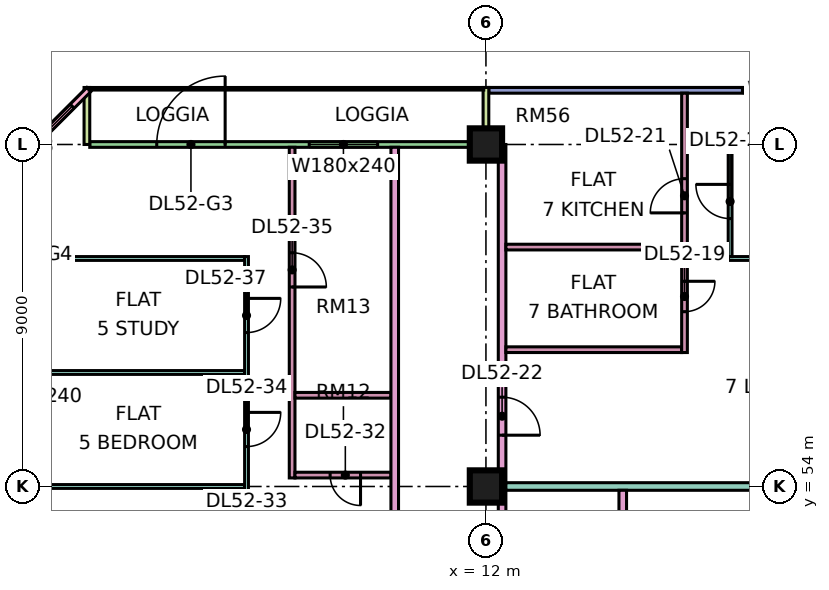
"""IFC4 building model, lengths in metres.
Left out: names, types, materials, properties, quantities, classifications, styles, units other than length and angle.
Written with IfcOpenShell. Run it as: python <this file> out.ifc"""

import sys

from ifc_helpers import new_model, si_unit, direction, frame, frame_2d, origin, origin_2d, place, context, subcontext, project, spatial, rectangle, extrude, element, fill, save


model = new_model("IFC4")
c1 = context("Model", 3, precision=1e-05, world=origin(), true_north=direction((0.0, 1.0)))
c2 = subcontext(c1, "Body", "Model", "MODEL_VIEW")
j1 = project(units=[si_unit("LENGTHUNIT", "METRE"), si_unit("PLANEANGLEUNIT", "RADIAN")], contexts=[c1])
p1 = place(None, origin())
s1 = spatial("IfcSite", under=j1, at=p1, CompositionType="ELEMENT")
p2 = place(p1, origin())
s2 = spatial("IfcBuilding", under=s1, at=p2, CompositionType="ELEMENT")
p3 = place(p2, frame((0.0, 0.0, 222.9)))
s3 = spatial("IfcBuildingStorey", under=s2, at=p3, CompositionType="ELEMENT", Elevation=222.9)
for number, where, z_axis, x_axis in (
    (1, (12.0, 54.0, 0.0), (0.0, 0.0, 1.0), (1.0, 0.0, 0.0)),
    (2, (12.0, 63.0, 0.0), (0.0, 0.0, 1.0), (1.0, 0.0, 0.0)),
):
    element("IfcColumn", number, at=place(p3, frame(where, z_axis=z_axis, x_axis=x_axis)), inside=s3, PredefinedType="COLUMN", context=c2, shape_type="SweptSolid", body=[
        extrude(rectangle(XDim=0.85, YDim=0.85, at=origin_2d()), origin(), (0.0, 0.0, 1.0), 3.75),
    ])
p4 = place(p3, frame((22.5, 64.425, 0.0), z_axis=(0.0, 0.0, 1.0), x_axis=(-1.0, 0.0, 0.0)))
e3 = element("IfcWall", 3, at=p4, inside=s3, PredefinedType="SOLIDWALL", context=c2, shape_type="SweptSolid", body=[
    extrude(rectangle(XDim=10.425, YDim=0.15, at=frame_2d((5.212, 0.0))), origin(), (0.0, 0.0, 1.0), 3.35),
])
p5 = place(p4, frame((0.75, 0.0, 0.45)))
e4 = element("IfcOpeningElement", 4, at=p5, cuts=e3, PredefinedType="OPENING", context=c2, shape_type="SweptSolid", body=[
    extrude(rectangle(XDim=3.0, YDim=2.4, at=frame_2d((1.5, 1.2))), frame((0.0, 0.085, 0.0), z_axis=(0.0, -1.0, 0.0), x_axis=(1.0, 0.0, 0.0)), (0.0, 0.0, 1.0), 0.17),
])
p6 = place(p3, frame((11.925, 63.0, 0.0), z_axis=(0.0, 0.0, 1.0), x_axis=(-1.0, 0.0, 0.0)))
e5 = element("IfcWall", 5, at=p6, inside=s3, PredefinedType="SOLIDWALL", context=c2, shape_type="SweptSolid", body=[
    extrude(rectangle(XDim=10.35, YDim=0.15, at=frame_2d((5.175, 0.0))), origin(), (0.0, 0.0, 1.0), 3.35),
])
p7 = place(p6, frame((2.775, 0.0, 0.45)))
e6 = element("IfcOpeningElement", 6, at=p7, cuts=e5, PredefinedType="OPENING", context=c2, shape_type="SweptSolid", body=[
    extrude(rectangle(XDim=1.8, YDim=2.4, at=frame_2d((0.9, 1.2))), frame((0.0, 0.085, 0.0), z_axis=(0.0, -1.0, 0.0), x_axis=(1.0, 0.0, 0.0)), (0.0, 0.0, 1.0), 0.17),
])
p8 = place(p6, frame((6.788, 0.0, 0.0)))
e7 = element("IfcOpeningElement", 7, at=p8, cuts=e5, PredefinedType="OPENING", context=c2, shape_type="SweptSolid", body=[
    extrude(rectangle(XDim=1.8, YDim=2.4, at=frame_2d((0.9, 1.2))), frame((0.0, 0.085, 0.0), z_axis=(0.0, -1.0, 0.0), x_axis=(1.0, 0.0, 0.0)), (0.0, 0.0, 1.0), 0.17),
])
for number, where, z_axis, x_axis in (
    (8, (12.0, 64.5, 0.0), (0.0, 0.0, 1.0), (0.0, -1.0, 0.0)),
    (9, (1.5, 64.5, 0.0), (0.0, 0.0, 1.0), (0.0, -1.0, 0.0)),
):
    element("IfcWall", number, at=place(p3, frame(where, z_axis=z_axis, x_axis=x_axis)), inside=s3, PredefinedType="SOLIDWALL", context=c2, shape_type="SweptSolid", body=[
        extrude(rectangle(XDim=1.5, YDim=0.15, at=frame_2d((0.75, 0.0))), origin(), (0.0, 0.0, 1.0), 3.35),
    ])
p9 = place(p3, frame((1.553, 64.447, 0.0), z_axis=(0.0, 0.0, 1.0), x_axis=(-0.707106781187, -0.707106781187, 0.0)))
e10 = element("IfcWall", 10, at=p9, inside=s3, PredefinedType="SOLIDWALL", context=c2, shape_type="SweptSolid", body=[
    extrude(rectangle(XDim=4.243, YDim=0.15, at=frame_2d((2.121, 0.0))), origin(), (0.0, 0.0, 1.0), 3.35),
])
p10 = place(p9, frame((0.621, 0.0, 0.45)))
e11 = element("IfcOpeningElement", 11, at=p10, cuts=e10, PredefinedType="OPENING", context=c2, shape_type="SweptSolid", body=[
    extrude(rectangle(XDim=3.0, YDim=2.4, at=frame_2d((1.5, 1.2))), frame((0.0, 0.085, 0.0), z_axis=(0.0, -1.0, 0.0), x_axis=(1.0, 0.0, 0.0)), (0.0, 0.0, 1.0), 0.17),
])
for number, where, z_axis, x_axis in (
    (12, (0.074, 54.0, 0.0), (0.0, 0.0, 1.0), (1.0, 0.0, 0.0)),
    (13, (0.074, 57.0, 0.0), (0.0, 0.0, 1.0), (1.0, 0.0, 0.0)),
    (14, (0.074, 60.0, 0.0), (0.0, 0.0, 1.0), (1.0, 0.0, 0.0)),
):
    element("IfcWall", number, at=place(p3, frame(where, z_axis=z_axis, x_axis=x_axis)), inside=s3, PredefinedType="PARTITIONING", context=c2, shape_type="SweptSolid", body=[
        extrude(rectangle(XDim=5.576, YDim=0.1, at=frame_2d((2.788, 0.0))), origin(), (0.0, 0.0, 1.0), 3.35),
    ])
p11 = place(p3, frame((5.7, 51.1, 0.0), z_axis=(0.0, 0.0, 1.0), x_axis=(0.0, 1.0, 0.0)))
e15 = element("IfcWall", 15, at=p11, inside=s3, PredefinedType="PARTITIONING", context=c2, shape_type="SweptSolid", body=[
    extrude(rectangle(XDim=8.95, YDim=0.1, at=frame_2d((4.475, 0.0))), origin(), (0.0, 0.0, 1.0), 3.35),
])
p12 = place(p11, frame((0.95, 0.0, 0.0)))
e16 = element("IfcOpeningElement", 16, at=p12, cuts=e15, PredefinedType="OPENING", context=c2, shape_type="SweptSolid", body=[
    extrude(rectangle(XDim=0.9, YDim=2.1, at=frame_2d((0.45, 1.05))), frame((0.0, 0.06, 0.0), z_axis=(0.0, -1.0, 0.0), x_axis=(1.0, 0.0, 0.0)), (0.0, 0.0, 1.0), 0.12),
])
p13 = place(p11, frame((3.95, 0.0, 0.0)))
e17 = element("IfcOpeningElement", 17, at=p13, cuts=e15, PredefinedType="OPENING", context=c2, shape_type="SweptSolid", body=[
    extrude(rectangle(XDim=0.9, YDim=2.1, at=frame_2d((0.45, 1.05))), frame((0.0, 0.06, 0.0), z_axis=(0.0, -1.0, 0.0), x_axis=(1.0, 0.0, 0.0)), (0.0, 0.0, 1.0), 0.12),
])
p14 = place(p11, frame((6.95, 0.0, 0.0)))
e18 = element("IfcOpeningElement", 18, at=p14, cuts=e15, PredefinedType="OPENING", context=c2, shape_type="SweptSolid", body=[
    extrude(rectangle(XDim=0.9, YDim=2.1, at=frame_2d((0.45, 1.05))), frame((0.0, 0.06, 0.0), z_axis=(0.0, -1.0, 0.0), x_axis=(1.0, 0.0, 0.0)), (0.0, 0.0, 1.0), 0.12),
])
p15 = place(p3, frame((6.9, 54.225, 0.0), z_axis=(0.0, 0.0, 1.0), x_axis=(0.0, 1.0, 0.0)))
e19 = element("IfcWall", 19, at=p15, inside=s3, PredefinedType="PARTITIONING", context=c2, shape_type="SweptSolid", body=[
    extrude(rectangle(XDim=8.701, YDim=0.15, at=frame_2d((4.351, 0.0))), origin(), (0.0, 0.0, 1.0), 3.35),
])
p16 = place(p15, frame((5.025, 0.0, 0.0)))
e20 = element("IfcOpeningElement", 20, at=p16, cuts=e19, PredefinedType="OPENING", context=c2, shape_type="SweptSolid", body=[
    extrude(rectangle(XDim=0.9, YDim=2.1, at=frame_2d((0.45, 1.05))), frame((0.0, 0.085, 0.0), z_axis=(0.0, -1.0, 0.0), x_axis=(1.0, 0.0, 0.0)), (0.0, 0.0, 1.0), 0.17),
])
p17 = place(p3, frame((6.975, 54.3, 0.0), z_axis=(0.0, 0.0, 1.0), x_axis=(1.0, 0.0, 0.0)))
e21 = element("IfcWall", 21, at=p17, inside=s3, PredefinedType="PARTITIONING", context=c2, shape_type="SweptSolid", body=[
    extrude(rectangle(XDim=2.525, YDim=0.15, at=frame_2d((1.262, 0.0))), origin(), (0.0, 0.0, 1.0), 3.35),
])
p18 = place(p17, frame((0.925, 0.0, 0.0)))
e22 = element("IfcOpeningElement", 22, at=p18, cuts=e21, PredefinedType="OPENING", context=c2, shape_type="SweptSolid", body=[
    extrude(rectangle(XDim=0.8, YDim=2.1, at=frame_2d((0.4, 1.05))), frame((0.0, 0.085, 0.0), z_axis=(0.0, -1.0, 0.0), x_axis=(1.0, 0.0, 0.0)), (0.0, 0.0, 1.0), 0.17),
])
p19 = place(p3, frame((6.975, 56.4, 0.0), z_axis=(0.0, 0.0, 1.0), x_axis=(1.0, 0.0, 0.0)))
e23 = element("IfcWall", 23, at=p19, inside=s3, PredefinedType="PARTITIONING", context=c2, shape_type="SweptSolid", body=[
    extrude(rectangle(XDim=2.525, YDim=0.15, at=frame_2d((1.262, 0.0))), origin(), (0.0, 0.0, 1.0), 3.35),
])
p20 = place(p3, frame((9.6, 20.0, 0.0), z_axis=(0.0, 0.0, 1.0), x_axis=(0.0, 1.0, 0.0)))
e24 = element("IfcWall", 24, at=p20, inside=s3, PredefinedType="PARTITIONING", context=c2, shape_type="SweptSolid", body=[
    extrude(rectangle(XDim=42.926, YDim=0.2, at=frame_2d((21.463, 0.0))), origin(), (0.0, 0.0, 1.0), 3.35),
])
p21 = place(p20, frame((17.1, 0.0, 0.0)))
e25 = element("IfcOpeningElement", 25, at=p21, cuts=e24, PredefinedType="OPENING", context=c2, shape_type="SweptSolid", body=[
    extrude(rectangle(XDim=1.0, YDim=2.1, at=frame_2d((0.5, 1.05))), frame((0.0, 0.11, 0.0), z_axis=(0.0, -1.0, 0.0), x_axis=(1.0, 0.0, 0.0)), (0.0, 0.0, 1.0), 0.22),
])
p22 = place(p20, frame((32.1, 0.0, 0.0)))
e26 = element("IfcOpeningElement", 26, at=p22, cuts=e24, PredefinedType="OPENING", context=c2, shape_type="SweptSolid", body=[
    extrude(rectangle(XDim=1.0, YDim=2.1, at=frame_2d((0.5, 1.05))), frame((0.0, 0.11, 0.0), z_axis=(0.0, -1.0, 0.0), x_axis=(1.0, 0.0, 0.0)), (0.0, 0.0, 1.0), 0.22),
])
p23 = place(p20, frame((0.6, 0.0, 0.0)))
e27 = element("IfcOpeningElement", 27, at=p23, cuts=e24, PredefinedType="OPENING", context=c2, shape_type="SweptSolid", body=[
    extrude(rectangle(XDim=1.2, YDim=2.1, at=frame_2d((0.6, 1.05))), frame((0.0, 0.11, 0.0), z_axis=(0.0, -1.0, 0.0), x_axis=(1.0, 0.0, 0.0)), (0.0, 0.0, 1.0), 0.22),
])
p24 = place(p20, frame((14.1, 0.0, 0.0)))
e28 = element("IfcOpeningElement", 28, at=p24, cuts=e24, PredefinedType="OPENING", context=c2, shape_type="SweptSolid", body=[
    extrude(rectangle(XDim=1.0, YDim=2.1, at=frame_2d((0.5, 1.05))), frame((0.0, 0.11, 0.0), z_axis=(0.0, -1.0, 0.0), x_axis=(1.0, 0.0, 0.0)), (0.0, 0.0, 1.0), 0.22),
])
p25 = place(p3, frame((12.425, 20.0, 0.0), z_axis=(0.0, 0.0, 1.0), x_axis=(0.0, 1.0, 0.0)))
e29 = element("IfcWall", 29, at=p25, inside=s3, PredefinedType="PARTITIONING", context=c2, shape_type="SweptSolid", body=[
    extrude(rectangle(XDim=43.0, YDim=0.2, at=frame_2d((21.5, 0.0))), origin(), (0.0, 0.0, 1.0), 3.35),
])
p26 = place(p25, frame((7.15, 0.0, 0.0)))
e30 = element("IfcOpeningElement", 30, at=p26, cuts=e29, PredefinedType="OPENING", context=c2, shape_type="SweptSolid", body=[
    extrude(rectangle(XDim=1.6, YDim=2.1, at=frame_2d((0.8, 1.05))), frame((0.0, 0.11, 0.0), z_axis=(0.0, -1.0, 0.0), x_axis=(1.0, 0.0, 0.0)), (0.0, 0.0, 1.0), 0.22),
])
p27 = place(p25, frame((13.5, 0.0, 0.0)))
e31 = element("IfcOpeningElement", 31, at=p27, cuts=e29, PredefinedType="OPENING", context=c2, shape_type="SweptSolid", body=[
    extrude(rectangle(XDim=1.0, YDim=2.1, at=frame_2d((0.5, 1.05))), frame((0.0, 0.11, 0.0), z_axis=(0.0, -1.0, 0.0), x_axis=(1.0, 0.0, 0.0)), (0.0, 0.0, 1.0), 0.22),
])
p28 = place(p25, frame((22.9, 0.0, 0.0)))
e32 = element("IfcOpeningElement", 32, at=p28, cuts=e29, PredefinedType="OPENING", context=c2, shape_type="SweptSolid", body=[
    extrude(rectangle(XDim=1.0, YDim=2.1, at=frame_2d((0.5, 1.05))), frame((0.0, 0.11, 0.0), z_axis=(0.0, -1.0, 0.0), x_axis=(1.0, 0.0, 0.0)), (0.0, 0.0, 1.0), 0.22),
])
p29 = place(p25, frame((35.35, 0.0, 0.0)))
e33 = element("IfcOpeningElement", 33, at=p29, cuts=e29, PredefinedType="OPENING", context=c2, shape_type="SweptSolid", body=[
    extrude(rectangle(XDim=1.0, YDim=2.1, at=frame_2d((0.5, 1.05))), frame((0.0, 0.11, 0.0), z_axis=(0.0, -1.0, 0.0), x_axis=(1.0, 0.0, 0.0)), (0.0, 0.0, 1.0), 0.22),
])
p30 = place(p25, frame((1.15, 0.0, 0.0)))
e34 = element("IfcOpeningElement", 34, at=p30, cuts=e29, PredefinedType="OPENING", context=c2, shape_type="SweptSolid", body=[
    extrude(rectangle(XDim=1.8, YDim=2.1, at=frame_2d((0.9, 1.05))), frame((0.0, 0.11, 0.0), z_axis=(0.0, -1.0, 0.0), x_axis=(1.0, 0.0, 0.0)), (0.0, 0.0, 1.0), 0.22),
])
p31 = place(p25, frame((28.6, 0.0, 0.0)))
e35 = element("IfcOpeningElement", 35, at=p31, cuts=e29, PredefinedType="OPENING", context=c2, shape_type="SweptSolid", body=[
    extrude(rectangle(XDim=1.8, YDim=2.1, at=frame_2d((0.9, 1.05))), frame((0.0, 0.11, 0.0), z_axis=(0.0, -1.0, 0.0), x_axis=(1.0, 0.0, 0.0)), (0.0, 0.0, 1.0), 0.22),
])
p32 = place(p3, frame((12.525, 54.0, 0.0), z_axis=(0.0, 0.0, 1.0), x_axis=(1.0, 0.0, 0.0)))
e36 = element("IfcWall", 36, at=p32, inside=s3, PredefinedType="PARTITIONING", context=c2, shape_type="SweptSolid", body=[
    extrude(rectangle(XDim=11.401, YDim=0.2, at=frame_2d((5.701, 0.0))), origin(), (0.0, 0.0, 1.0), 3.35),
])
for number, where, z_axis, x_axis in (
    (37, (12.525, 57.6, 0.0), (0.0, 0.0, 1.0), (1.0, 0.0, 0.0)),
    (38, (12.525, 60.3, 0.0), (0.0, 0.0, 1.0), (1.0, 0.0, 0.0)),
):
    element("IfcWall", number, at=place(p3, frame(where, z_axis=z_axis, x_axis=x_axis)), inside=s3, PredefinedType="PARTITIONING", context=c2, shape_type="SweptSolid", body=[
        extrude(rectangle(XDim=4.625, YDim=0.15, at=frame_2d((2.312, 0.0))), origin(), (0.0, 0.0, 1.0), 3.35),
    ])
p33 = place(p3, frame((15.6, 51.225, 0.0), z_axis=(0.0, 0.0, 1.0), x_axis=(0.0, 1.0, 0.0)))
e39 = element("IfcWall", 39, at=p33, inside=s3, PredefinedType="PARTITIONING", context=c2, shape_type="SweptSolid", body=[
    extrude(rectangle(XDim=2.675, YDim=0.2, at=frame_2d((1.337, 0.0))), origin(), (0.0, 0.0, 1.0), 3.35),
])
p34 = place(p3, frame((17.225, 57.525, 0.0), z_axis=(0.0, 0.0, 1.0), x_axis=(0.0, 1.0, 0.0)))
e40 = element("IfcWall", 40, at=p34, inside=s3, PredefinedType="PARTITIONING", context=c2, shape_type="SweptSolid", body=[
    extrude(rectangle(XDim=6.825, YDim=0.15, at=frame_2d((3.413, 0.0))), origin(), (0.0, 0.0, 1.0), 3.35),
])
p35 = place(p34, frame((1.075, 0.0, 0.0)))
e41 = element("IfcOpeningElement", 41, at=p35, cuts=e40, PredefinedType="OPENING", context=c2, shape_type="SweptSolid", body=[
    extrude(rectangle(XDim=0.8, YDim=2.1, at=frame_2d((0.4, 1.05))), frame((0.0, 0.085, 0.0), z_axis=(0.0, -1.0, 0.0), x_axis=(1.0, 0.0, 0.0)), (0.0, 0.0, 1.0), 0.17),
])
p36 = place(p34, frame((3.675, 0.0, 0.0)))
e42 = element("IfcOpeningElement", 42, at=p36, cuts=e40, PredefinedType="OPENING", context=c2, shape_type="SweptSolid", body=[
    extrude(rectangle(XDim=0.9, YDim=2.1, at=frame_2d((0.45, 1.05))), frame((0.0, 0.085, 0.0), z_axis=(0.0, -1.0, 0.0), x_axis=(1.0, 0.0, 0.0)), (0.0, 0.0, 1.0), 0.17),
])
p37 = place(p3, frame((18.0, 63.0, 0.0), z_axis=(0.0, 0.0, 1.0), x_axis=(1.0, 0.0, 0.0)))
e43 = element("IfcWall", 43, at=p37, inside=s3, PredefinedType="PARTITIONING", context=c2, shape_type="SweptSolid", body=[
    extrude(rectangle(XDim=0.375, YDim=0.1, at=frame_2d((0.188, 0.0))), origin(), (0.0, 0.0, 1.0), 3.35),
])
p38 = place(p3, frame((18.375, 60.0, 0.0), z_axis=(0.0, 0.0, 1.0), x_axis=(1.0, 0.0, 0.0)))
e44 = element("IfcWall", 44, at=p38, inside=s3, PredefinedType="PARTITIONING", context=c2, shape_type="SweptSolid", body=[
    extrude(rectangle(XDim=5.551, YDim=0.1, at=frame_2d((2.775, 0.0))), origin(), (0.0, 0.0, 1.0), 3.35),
])
p39 = place(p3, frame((18.425, 60.05, 0.0), z_axis=(0.0, 0.0, 1.0), x_axis=(0.0, 1.0, 0.0)))
e45 = element("IfcWall", 45, at=p39, inside=s3, PredefinedType="PARTITIONING", context=c2, shape_type="SweptSolid", body=[
    extrude(rectangle(XDim=3.0, YDim=0.1, at=frame_2d((1.5, 0.0))), origin(), (0.0, 0.0, 1.0), 3.35),
])
p40 = place(p39, frame((1.0, 0.0, 0.0)))
e46 = element("IfcOpeningElement", 46, at=p40, cuts=e45, PredefinedType="OPENING", context=c2, shape_type="SweptSolid", body=[
    extrude(rectangle(XDim=0.9, YDim=2.1, at=frame_2d((0.45, 1.05))), frame((0.0, 0.06, 0.0), z_axis=(0.0, -1.0, 0.0), x_axis=(1.0, 0.0, 0.0)), (0.0, 0.0, 1.0), 0.12),
])
p41 = place(p5, origin())
e47 = element("IfcWindow", 47, at=p41, inside=s3, PartitioningType="SINGLE_PANEL", PredefinedType="WINDOW", context=c2, shape_type="SweptSolid", body=[
    extrude(rectangle(XDim=3.0, YDim=2.4, at=frame_2d((1.5, 1.2))), frame((0.0, 0.03, 0.0), z_axis=(0.0, -1.0, 0.0), x_axis=(1.0, 0.0, 0.0)), (0.0, 0.0, 1.0), 0.06),
])
fill(e4, e47)
p42 = place(p7, origin())
e48 = element("IfcWindow", 48, at=p42, inside=s3, PartitioningType="SINGLE_PANEL", PredefinedType="WINDOW", context=c2, shape_type="SweptSolid", body=[
    extrude(rectangle(XDim=1.8, YDim=2.4, at=frame_2d((0.9, 1.2))), frame((0.0, 0.03, 0.0), z_axis=(0.0, -1.0, 0.0), x_axis=(1.0, 0.0, 0.0)), (0.0, 0.0, 1.0), 0.06),
])
fill(e6, e48)
p43 = place(p8, frame((1.8, 0.0, 0.0), z_axis=(0.0, 0.0, 1.0), x_axis=(-1.0, 0.0, 0.0)))
e49 = element("IfcDoor", 49, at=p43, inside=s3, OperationType="DOUBLE_DOOR_SINGLE_SWING", PredefinedType="DOOR", context=c2, shape_type="SweptSolid", body=[
    extrude(rectangle(XDim=1.8, YDim=2.4, at=frame_2d((0.9, 1.2))), frame((0.0, 0.025, 0.0), z_axis=(0.0, -1.0, 0.0), x_axis=(1.0, 0.0, 0.0)), (0.0, 0.0, 1.0), 0.05),
])
fill(e7, e49)
p44 = place(p10, origin())
e50 = element("IfcWindow", 50, at=p44, inside=s3, PartitioningType="SINGLE_PANEL", PredefinedType="WINDOW", context=c2, shape_type="SweptSolid", body=[
    extrude(rectangle(XDim=3.0, YDim=2.4, at=frame_2d((1.5, 1.2))), frame((0.0, 0.03, 0.0), z_axis=(0.0, -1.0, 0.0), x_axis=(1.0, 0.0, 0.0)), (0.0, 0.0, 1.0), 0.06),
])
fill(e11, e50)
p45 = place(p35, origin())
e51 = element("IfcDoor", 51, at=p45, inside=s3, OperationType="SINGLE_SWING_RIGHT", PredefinedType="DOOR", context=c2, shape_type="SweptSolid", body=[
    extrude(rectangle(XDim=0.8, YDim=2.1, at=frame_2d((0.4, 1.05))), frame((0.0, 0.025, 0.0), z_axis=(0.0, -1.0, 0.0), x_axis=(1.0, 0.0, 0.0)), (0.0, 0.0, 1.0), 0.05),
])
fill(e41, e51)
p46 = place(p40, frame((0.9, 0.0, 0.0), z_axis=(0.0, 0.0, 1.0), x_axis=(-1.0, 0.0, 0.0)))
e52 = element("IfcDoor", 52, at=p46, inside=s3, OperationType="SINGLE_SWING_RIGHT", PredefinedType="DOOR", context=c2, shape_type="SweptSolid", body=[
    extrude(rectangle(XDim=0.9, YDim=2.1, at=frame_2d((0.45, 1.05))), frame((0.0, 0.025, 0.0), z_axis=(0.0, -1.0, 0.0), x_axis=(1.0, 0.0, 0.0)), (0.0, 0.0, 1.0), 0.05),
])
fill(e46, e52)
p47 = place(p36, origin())
e53 = element("IfcDoor", 53, at=p47, inside=s3, OperationType="SINGLE_SWING_LEFT", PredefinedType="DOOR", context=c2, shape_type="SweptSolid", body=[
    extrude(rectangle(XDim=0.9, YDim=2.1, at=frame_2d((0.45, 1.05))), frame((0.0, 0.025, 0.0), z_axis=(0.0, -1.0, 0.0), x_axis=(1.0, 0.0, 0.0)), (0.0, 0.0, 1.0), 0.05),
])
fill(e42, e53)
p48 = place(p29, frame((1.0, 0.0, 0.0), z_axis=(0.0, 0.0, 1.0), x_axis=(-1.0, 0.0, 0.0)))
e54 = element("IfcDoor", 54, at=p48, inside=s3, OperationType="SINGLE_SWING_LEFT", PredefinedType="DOOR", context=c2, shape_type="SweptSolid", body=[
    extrude(rectangle(XDim=1.0, YDim=2.1, at=frame_2d((0.5, 1.05))), frame((0.0, 0.025, 0.0), z_axis=(0.0, -1.0, 0.0), x_axis=(1.0, 0.0, 0.0)), (0.0, 0.0, 1.0), 0.05),
])
fill(e33, e54)
p49 = place(p18, origin())
e55 = element("IfcDoor", 55, at=p49, inside=s3, OperationType="SINGLE_SWING_RIGHT", PredefinedType="DOOR", context=c2, shape_type="SweptSolid", body=[
    extrude(rectangle(XDim=0.8, YDim=2.1, at=frame_2d((0.4, 1.05))), frame((0.0, 0.025, 0.0), z_axis=(0.0, -1.0, 0.0), x_axis=(1.0, 0.0, 0.0)), (0.0, 0.0, 1.0), 0.05),
])
fill(e22, e55)
p50 = place(p13, origin())
e56 = element("IfcDoor", 56, at=p50, inside=s3, OperationType="SINGLE_SWING_RIGHT", PredefinedType="DOOR", context=c2, shape_type="SweptSolid", body=[
    extrude(rectangle(XDim=0.9, YDim=2.1, at=frame_2d((0.45, 1.05))), frame((0.0, 0.025, 0.0), z_axis=(0.0, -1.0, 0.0), x_axis=(1.0, 0.0, 0.0)), (0.0, 0.0, 1.0), 0.05),
])
fill(e17, e56)
p51 = place(p16, frame((0.9, 0.0, 0.0), z_axis=(0.0, 0.0, 1.0), x_axis=(-1.0, 0.0, 0.0)))
e57 = element("IfcDoor", 57, at=p51, inside=s3, OperationType="SINGLE_SWING_LEFT", PredefinedType="DOOR", context=c2, shape_type="SweptSolid", body=[
    extrude(rectangle(XDim=0.9, YDim=2.1, at=frame_2d((0.45, 1.05))), frame((0.0, 0.025, 0.0), z_axis=(0.0, -1.0, 0.0), x_axis=(1.0, 0.0, 0.0)), (0.0, 0.0, 1.0), 0.05),
])
fill(e20, e57)
p52 = place(p14, origin())
e58 = element("IfcDoor", 58, at=p52, inside=s3, OperationType="SINGLE_SWING_RIGHT", PredefinedType="DOOR", context=c2, shape_type="SweptSolid", body=[
    extrude(rectangle(XDim=0.9, YDim=2.1, at=frame_2d((0.45, 1.05))), frame((0.0, 0.025, 0.0), z_axis=(0.0, -1.0, 0.0), x_axis=(1.0, 0.0, 0.0)), (0.0, 0.0, 1.0), 0.05),
])
fill(e18, e58)
save(model, sys.argv[1])
